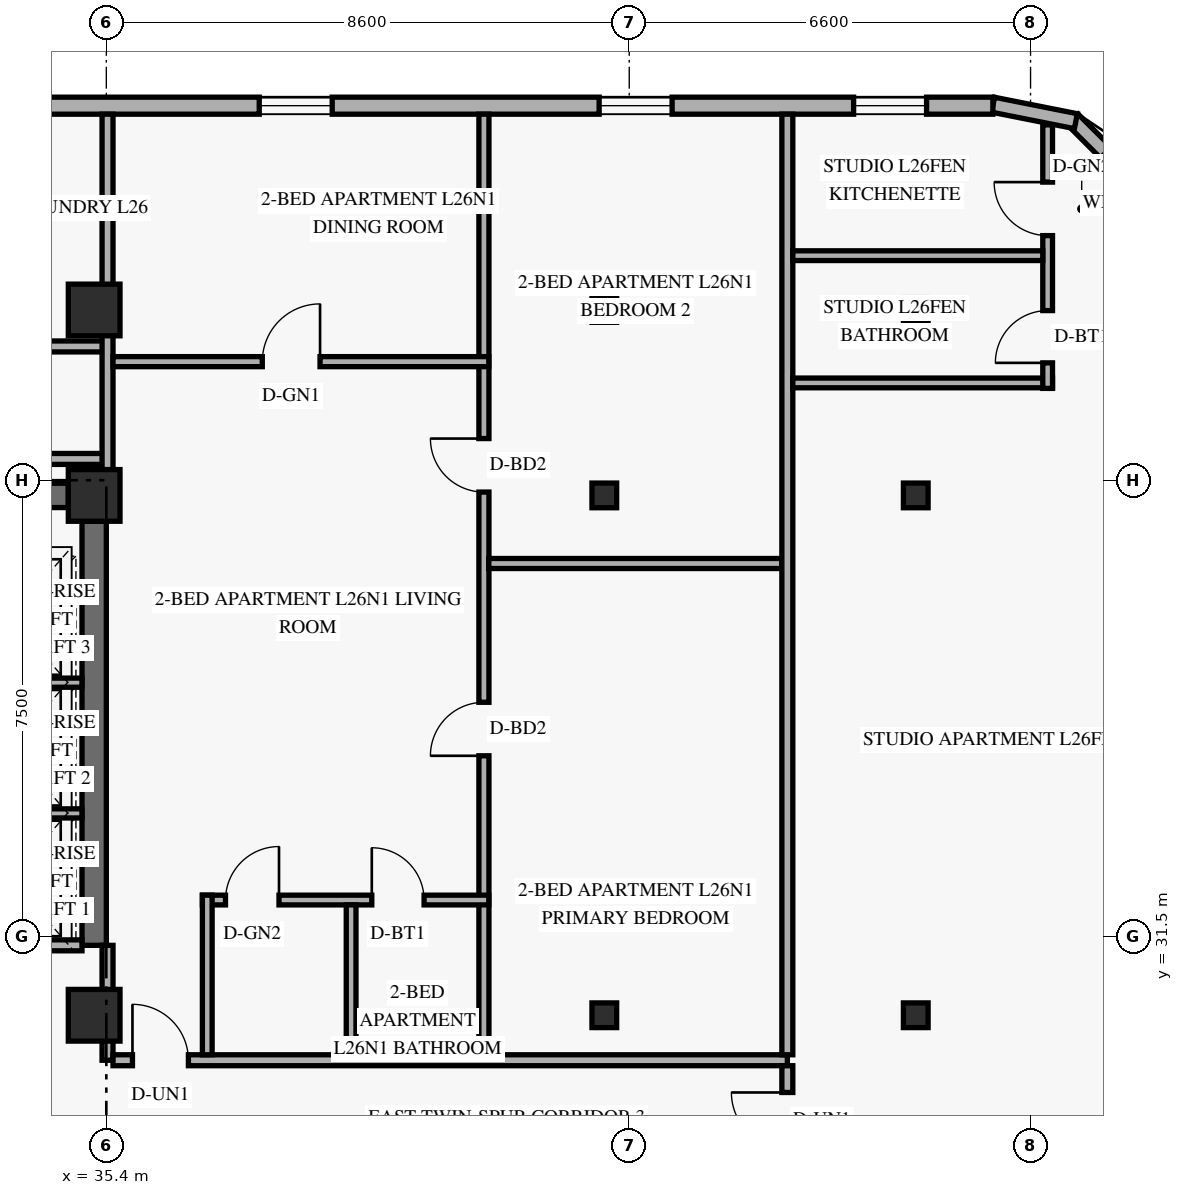
"""IFC4 building model, lengths in metres.
Left out: names, types, materials, properties, quantities, classifications, styles, units other than length and angle.
Written with IfcOpenShell. Run it as: python <this file> out.ifc"""

import sys

from ifc_helpers import new_model, si_unit, direction, frame, frame_2d, origin, origin_2d, place, context, subcontext, project, spatial, rectangle, hollow_rectangle, extrude, element, fill, save


model = new_model("IFC4")
c1 = context("Model", 3, precision=1e-05, world=origin(), true_north=direction((0.0, 1.0)))
c2 = subcontext(c1, "Body", "Model", "MODEL_VIEW")
j1 = project(units=[si_unit("LENGTHUNIT", "METRE"), si_unit("PLANEANGLEUNIT", "RADIAN")], contexts=[c1])
p1 = place(None, origin())
s1 = spatial("IfcSite", under=j1, at=p1, CompositionType="ELEMENT")
p2 = place(p1, origin())
s2 = spatial("IfcBuilding", under=s1, at=p2, CompositionType="ELEMENT")
p3 = place(p2, frame((0.0, 0.0, 102.6)))
s3 = spatial("IfcBuildingStorey", under=s2, at=p3, CompositionType="ELEMENT", Elevation=102.6)
p4 = place(p3, frame((35.2, 31.35, 0.0), z_axis=(0.0, 0.0, 1.0), x_axis=(0.0, 1.0, 0.0)))
e1 = element("IfcWall", 1, at=p4, inside=s3, PredefinedType="SHEAR", context=c2, shape_type="SweptSolid", body=[
    extrude(rectangle(XDim=6.975, YDim=0.4, at=frame_2d((3.487, 0.0))), origin(), (0.0, 0.0, 1.0), 2.749),
])
p5 = place(p3, frame((24.625, 38.75, 0.0), z_axis=(0.0, 0.0, 1.0), x_axis=(1.0, 0.0, 0.0)))
e2 = element("IfcWall", 2, at=p5, inside=s3, PredefinedType="SHEAR", context=c2, shape_type="SweptSolid", body=[
    extrude(rectangle(XDim=10.15, YDim=0.4, at=frame_2d((5.075, 0.0))), origin(), (0.0, 0.0, 1.0), 3.36),
])
p6 = place(p5, frame((5.2, 0.0, 0.0)))
e3 = element("IfcOpeningElement", 3, at=p6, cuts=e2, PredefinedType="OPENING", context=c2, shape_type="SweptSolid", body=[
    extrude(rectangle(XDim=1.05, YDim=2.15, at=frame_2d((0.525, 1.075))), frame((0.0, 0.21, 0.0), z_axis=(0.0, -1.0, 0.0), x_axis=(1.0, 0.0, 0.0)), (0.0, 0.0, 1.0), 0.42),
])
for number, where, z_axis, x_axis in (
    (4, (35.2, 30.2, 0.0), (0.0, 0.0, 1.0), (1.0, 0.0, 0.0)),
    (5, (35.2, 38.75, 0.0), (0.0, 0.0, 1.0), (1.0, 0.0, 0.0)),
    (6, (35.2, 41.8, 0.0), (0.0, 0.0, 1.0), (1.0, 0.0, 0.0)),
):
    element("IfcColumn", number, at=place(p3, frame(where, z_axis=z_axis, x_axis=x_axis)), inside=s3, PredefinedType="COLUMN", context=c2, shape_type="SweptSolid", body=[
        extrude(rectangle(XDim=0.85, YDim=0.85, at=origin_2d()), origin(), (0.0, 0.0, 1.0), 3.6),
    ])
for number, where, z_axis, x_axis in (
    (7, (43.527, 30.2, 0.0), (0.035, 0.0, 0.999), (0.0, 1.0, 0.0)),
    (8, (43.527, 38.75, 0.0), (0.035, 0.0, 0.999), (0.0, 1.0, 0.0)),
    (9, (43.527, 41.8, 0.0), (0.035, 0.0, 0.999), (0.0, 1.0, 0.0)),
):
    element("IfcColumn", number, at=place(p3, frame(where, z_axis=z_axis, x_axis=x_axis)), inside=s3, PredefinedType="COLUMN", context=c2, shape_type="SweptSolid", body=[
        extrude(hollow_rectangle(XDim=0.406, YDim=0.406, WallThickness=0.016, at=origin_2d()), origin(), (0.0, 0.0, 1.0), 3.602),
    ])
for number, where, z_axis, x_axis in (
    (10, (48.608, 30.2, 0.0), (0.058, 0.0, 0.998), (0.0, 1.0, 0.0)),
    (11, (48.608, 38.75, 0.0), (0.058, 0.0, 0.998), (0.0, 1.0, 0.0)),
    (12, (48.608, 41.8, 0.0), (0.058, 0.0, 0.998), (0.0, 1.0, 0.0)),
):
    element("IfcColumn", number, at=place(p3, frame(where, z_axis=z_axis, x_axis=x_axis)), inside=s3, PredefinedType="COLUMN", context=c2, shape_type="SweptSolid", body=[
        extrude(hollow_rectangle(XDim=0.406, YDim=0.406, WallThickness=0.016, at=origin_2d()), origin(), (0.0, 0.0, 1.0), 3.606),
    ])
p7 = place(p3, frame((53.232, 42.995, 0.0), z_axis=(0.0, 0.0, 1.0), x_axis=(-0.707151344399, 0.707062215165, 0.0)))
e13 = element("IfcWall", 13, at=p7, inside=s3, PredefinedType="SOLIDWALL", context=c2, shape_type="SweptSolid", body=[
    extrude(rectangle(XDim=2.739, YDim=0.25, at=frame_2d((1.37, 0.0))), origin(), (0.0, 0.0, 1.0), 3.36),
])
p8 = place(p7, frame((0.77, 0.0, 0.85)))
e14 = element("IfcOpeningElement", 14, at=p8, cuts=e13, PredefinedType="OPENING", context=c2, shape_type="SweptSolid", body=[
    extrude(rectangle(XDim=1.2, YDim=1.5, at=frame_2d((0.6, 0.75))), frame((0.0, 0.135, 0.0), z_axis=(0.0, -1.0, 0.0), x_axis=(1.0, 0.0, 0.0)), (0.0, 0.0, 1.0), 0.27),
])
p9 = place(p3, frame((51.345, 44.905, 0.0), z_axis=(0.0, 0.0, 1.0), x_axis=(-0.980809899341, 0.19496651342, 0.0)))
e15 = element("IfcWall", 15, at=p9, inside=s3, PredefinedType="SOLIDWALL", context=c2, shape_type="SweptSolid", body=[
    extrude(rectangle(XDim=1.389, YDim=0.25, at=frame_2d((0.694, 0.0))), origin(), (0.0, 0.0, 1.0), 3.36),
])
p10 = place(p3, frame((49.98, 45.16, 0.0), z_axis=(0.0, 0.0, 1.0), x_axis=(-1.0, 0.0, 0.0)))
e16 = element("IfcWall", 16, at=p10, inside=s3, PredefinedType="SOLIDWALL", context=c2, shape_type="SweptSolid", body=[
    extrude(rectangle(XDim=36.56, YDim=0.28, at=frame_2d((18.28, 0.0))), origin(), (0.0, 0.0, 1.0), 3.36),
])
p11 = place(p10, frame((31.845, 0.0, 0.85)))
e17 = element("IfcOpeningElement", 17, at=p11, cuts=e16, PredefinedType="OPENING", context=c2, shape_type="SweptSolid", body=[
    extrude(rectangle(XDim=1.2, YDim=1.5, at=frame_2d((0.6, 0.75))), frame((0.0, 0.15, 0.0), z_axis=(0.0, -1.0, 0.0), x_axis=(1.0, 0.0, 0.0)), (0.0, 0.0, 1.0), 0.3),
])
p12 = place(p10, frame((23.78, 0.0, 0.85)))
e18 = element("IfcOpeningElement", 18, at=p12, cuts=e16, PredefinedType="OPENING", context=c2, shape_type="SweptSolid", body=[
    extrude(rectangle(XDim=1.2, YDim=1.5, at=frame_2d((0.6, 0.75))), frame((0.0, 0.15, 0.0), z_axis=(0.0, -1.0, 0.0), x_axis=(1.0, 0.0, 0.0)), (0.0, 0.0, 1.0), 0.3),
])
p13 = place(p10, frame((16.895, 0.0, 0.85)))
e19 = element("IfcOpeningElement", 19, at=p13, cuts=e16, PredefinedType="OPENING", context=c2, shape_type="SweptSolid", body=[
    extrude(rectangle(XDim=1.2, YDim=1.5, at=frame_2d((0.6, 0.75))), frame((0.0, 0.15, 0.0), z_axis=(0.0, -1.0, 0.0), x_axis=(1.0, 0.0, 0.0)), (0.0, 0.0, 1.0), 0.3),
])
p14 = place(p10, frame((10.865, 0.0, 0.85)))
e20 = element("IfcOpeningElement", 20, at=p14, cuts=e16, PredefinedType="OPENING", context=c2, shape_type="SweptSolid", body=[
    extrude(rectangle(XDim=1.2, YDim=1.5, at=frame_2d((0.6, 0.75))), frame((0.0, 0.15, 0.0), z_axis=(0.0, -1.0, 0.0), x_axis=(1.0, 0.0, 0.0)), (0.0, 0.0, 1.0), 0.3),
])
p15 = place(p10, frame((5.275, 0.0, 0.85)))
e21 = element("IfcOpeningElement", 21, at=p15, cuts=e16, PredefinedType="OPENING", context=c2, shape_type="SweptSolid", body=[
    extrude(rectangle(XDim=1.2, YDim=1.5, at=frame_2d((0.6, 0.75))), frame((0.0, 0.15, 0.0), z_axis=(0.0, -1.0, 0.0), x_axis=(1.0, 0.0, 0.0)), (0.0, 0.0, 1.0), 0.3),
])
p16 = place(p10, frame((1.09, 0.0, 0.85)))
e22 = element("IfcOpeningElement", 22, at=p16, cuts=e16, PredefinedType="OPENING", context=c2, shape_type="SweptSolid", body=[
    extrude(rectangle(XDim=1.2, YDim=1.5, at=frame_2d((0.6, 0.75))), frame((0.0, 0.15, 0.0), z_axis=(0.0, -1.0, 0.0), x_axis=(1.0, 0.0, 0.0)), (0.0, 0.0, 1.0), 0.3),
])
p17 = place(p3, frame((32.74, 31.35, 0.0), z_axis=(0.0, 0.0, 1.0), x_axis=(1.0, 0.0, 0.0)))
e23 = element("IfcWall", 23, at=p17, inside=s3, PredefinedType="STANDARD", context=c2, shape_type="SweptSolid", body=[
    extrude(rectangle(XDim=2.26, YDim=0.18, at=frame_2d((1.13, 0.0))), origin(), (0.0, 0.0, 1.0), 3.36),
])
for number, where, z_axis, x_axis in (
    (24, (32.74, 33.52, 0.0), (0.0, 0.0, 1.0), (1.0, 0.0, 0.0)),
    (25, (32.74, 35.67, 0.0), (0.0, 0.0, 1.0), (1.0, 0.0, 0.0)),
):
    element("IfcWall", number, at=place(p3, frame(where, z_axis=z_axis, x_axis=x_axis)), inside=s3, PredefinedType="STANDARD", context=c2, shape_type="SweptSolid", body=[
        extrude(rectangle(XDim=2.26, YDim=0.15, at=frame_2d((1.13, 0.0))), origin(), (0.0, 0.0, 1.0), 3.36),
    ])
p18 = place(p3, frame((35.42, 29.46, 0.0), z_axis=(0.0, 0.0, 1.0), x_axis=(0.0, 1.0, 0.0)))
e26 = element("IfcWall", 26, at=p18, inside=s3, PredefinedType="STANDARD", context=c2, shape_type="SweptSolid", body=[
    extrude(rectangle(XDim=1.89, YDim=0.18, at=frame_2d((0.945, 0.0))), origin(), (0.0, 0.0, 1.0), 2.731),
])
p19 = place(p3, frame((35.51, 29.46, 0.0), z_axis=(0.0, 0.0, 1.0), x_axis=(1.0, 0.0, 0.0)))
e27 = element("IfcWall", 27, at=p19, inside=s3, PredefinedType="STANDARD", context=c2, shape_type="SweptSolid", body=[
    extrude(rectangle(XDim=11.09, YDim=0.18, at=frame_2d((5.545, 0.0))), origin(), (0.0, 0.0, 1.0), 2.731),
])
p20 = place(p19, frame((0.32, 0.0, 0.0)))
e28 = element("IfcOpeningElement", 28, at=p20, cuts=e27, PredefinedType="OPENING", context=c2, shape_type="SweptSolid", body=[
    extrude(rectangle(XDim=0.92, YDim=2.15, at=frame_2d((0.46, 1.075))), frame((0.0, 0.1, 0.0), z_axis=(0.0, -1.0, 0.0), x_axis=(1.0, 0.0, 0.0)), (0.0, 0.0, 1.0), 0.2),
])
p21 = place(p3, frame((21.74, 41.2, 0.0), z_axis=(0.0, 0.0, 1.0), x_axis=(1.0, 0.0, 0.0)))
e29 = element("IfcWall", 29, at=p21, inside=s3, PredefinedType="STANDARD", context=c2, shape_type="SweptSolid", body=[
    extrude(rectangle(XDim=13.68, YDim=0.18, at=frame_2d((6.84, 0.0))), origin(), (0.0, 0.0, 1.0), 2.731),
])
p22 = place(p21, frame((3.09, 0.0, 0.0)))
e30 = element("IfcOpeningElement", 30, at=p22, cuts=e29, PredefinedType="OPENING", context=c2, shape_type="SweptSolid", body=[
    extrude(rectangle(XDim=0.95, YDim=2.15, at=frame_2d((0.475, 1.075))), frame((0.0, 0.1, 0.0), z_axis=(0.0, -1.0, 0.0), x_axis=(1.0, 0.0, 0.0)), (0.0, 0.0, 1.0), 0.2),
])
p23 = place(p21, frame((10.11, 0.0, 0.0)))
e31 = element("IfcOpeningElement", 31, at=p23, cuts=e29, PredefinedType="OPENING", context=c2, shape_type="SweptSolid", body=[
    extrude(rectangle(XDim=0.95, YDim=2.15, at=frame_2d((0.475, 1.075))), frame((0.0, 0.1, 0.0), z_axis=(0.0, -1.0, 0.0), x_axis=(1.0, 0.0, 0.0)), (0.0, 0.0, 1.0), 0.2),
])
p24 = place(p3, frame((23.85, 39.35, 0.0), z_axis=(0.0, 0.0, 1.0), x_axis=(1.0, 0.0, 0.0)))
e32 = element("IfcWall", 32, at=p24, inside=s3, PredefinedType="STANDARD", context=c2, shape_type="SweptSolid", body=[
    extrude(rectangle(XDim=11.57, YDim=0.18, at=frame_2d((5.785, 0.0))), origin(), (0.0, 0.0, 1.0), 2.731),
])
p25 = place(p3, frame((35.42, 38.75, 0.0), z_axis=(0.0, 0.0, 1.0), x_axis=(0.0, 1.0, 0.0)))
e33 = element("IfcWall", 33, at=p25, inside=s3, PredefinedType="PARTITIONING", context=c2, shape_type="SweptSolid", body=[
    extrude(rectangle(XDim=6.27, YDim=0.18, at=frame_2d((3.135, 0.0))), origin(), (0.0, 0.0, 1.0), 2.731),
])
p26 = place(p3, frame((41.61, 29.55, 0.0), z_axis=(0.0, 0.0, 1.0), x_axis=(0.0, 1.0, 0.0)))
e34 = element("IfcWall", 34, at=p26, inside=s3, PredefinedType="PARTITIONING", context=c2, shape_type="SweptSolid", body=[
    extrude(rectangle(XDim=15.47, YDim=0.165, at=frame_2d((7.735, 0.0))), origin(), (0.0, 0.0, 1.0), 2.731),
])
p27 = place(p26, frame((4.917, 0.0, 0.0)))
e35 = element("IfcOpeningElement", 35, at=p27, cuts=e34, PredefinedType="OPENING", context=c2, shape_type="SweptSolid", body=[
    extrude(rectangle(XDim=0.88, YDim=2.14, at=frame_2d((0.44, 1.07))), frame((0.0, 0.093, 0.0), z_axis=(0.0, -1.0, 0.0), x_axis=(1.0, 0.0, 0.0)), (0.0, 0.0, 1.0), 0.185),
])
p28 = place(p26, frame((9.255, 0.0, 0.0)))
e36 = element("IfcOpeningElement", 36, at=p28, cuts=e34, PredefinedType="OPENING", context=c2, shape_type="SweptSolid", body=[
    extrude(rectangle(XDim=0.88, YDim=2.14, at=frame_2d((0.44, 1.07))), frame((0.0, 0.093, 0.0), z_axis=(0.0, -1.0, 0.0), x_axis=(1.0, 0.0, 0.0)), (0.0, 0.0, 1.0), 0.185),
])
p29 = place(p3, frame((36.98, 32.095, 0.0), z_axis=(0.0, 0.0, 1.0), x_axis=(1.0, 0.0, 0.0)))
e37 = element("IfcWall", 37, at=p29, inside=s3, PredefinedType="PLUMBINGWALL", context=c2, shape_type="SweptSolid", body=[
    extrude(rectangle(XDim=4.71, YDim=0.16, at=frame_2d((2.355, 0.0))), origin(), (0.0, 0.0, 1.0), 3.36),
])
p30 = place(p29, frame((0.38, 0.0, 0.0)))
e38 = element("IfcOpeningElement", 38, at=p30, cuts=e37, PredefinedType="OPENING", context=c2, shape_type="SweptSolid", body=[
    extrude(rectangle(XDim=0.88, YDim=2.12, at=frame_2d((0.44, 1.06))), frame((0.0, 0.09, 0.0), z_axis=(0.0, -1.0, 0.0), x_axis=(1.0, 0.0, 0.0)), (0.0, 0.0, 1.0), 0.18),
])
p31 = place(p29, frame((2.786, 0.0, 0.0)))
e39 = element("IfcOpeningElement", 39, at=p31, cuts=e37, PredefinedType="OPENING", context=c2, shape_type="SweptSolid", body=[
    extrude(rectangle(XDim=0.86, YDim=2.12, at=frame_2d((0.43, 1.06))), frame((0.0, 0.09, 0.0), z_axis=(0.0, -1.0, 0.0), x_axis=(1.0, 0.0, 0.0)), (0.0, 0.0, 1.0), 0.18),
])
p32 = place(p3, frame((37.06, 29.55, 0.0), z_axis=(0.0, 0.0, 1.0), x_axis=(0.0, 1.0, 0.0)))
e40 = element("IfcWall", 40, at=p32, inside=s3, PredefinedType="PLUMBINGWALL", context=c2, shape_type="SweptSolid", body=[
    extrude(rectangle(XDim=2.625, YDim=0.16, at=frame_2d((1.312, 0.0))), origin(), (0.0, 0.0, 1.0), 2.731),
])
p33 = place(p3, frame((39.426, 29.55, 0.0), z_axis=(0.0, 0.0, 1.0), x_axis=(0.0, 1.0, 0.0)))
e41 = element("IfcWall", 41, at=p33, inside=s3, PredefinedType="PLUMBINGWALL", context=c2, shape_type="SweptSolid", body=[
    extrude(rectangle(XDim=2.465, YDim=0.16, at=frame_2d((1.232, 0.0))), origin(), (0.0, 0.0, 1.0), 2.731),
])
p34 = place(p3, frame((35.51, 40.95, 0.0), z_axis=(0.0, 0.0, 1.0), x_axis=(1.0, 0.0, 0.0)))
e42 = element("IfcWall", 42, at=p34, inside=s3, PredefinedType="PARTITIONING", context=c2, shape_type="SweptSolid", body=[
    extrude(rectangle(XDim=6.18, YDim=0.165, at=frame_2d((3.09, 0.0))), origin(), (0.0, 0.0, 1.0), 3.36),
])
p35 = place(p34, frame((2.455, 0.0, 0.0)))
e43 = element("IfcOpeningElement", 43, at=p35, cuts=e42, PredefinedType="OPENING", context=c2, shape_type="SweptSolid", body=[
    extrude(rectangle(XDim=0.95, YDim=2.15, at=frame_2d((0.475, 1.075))), frame((0.0, 0.093, 0.0), z_axis=(0.0, -1.0, 0.0), x_axis=(1.0, 0.0, 0.0)), (0.0, 0.0, 1.0), 0.185),
])
p36 = place(p3, frame((41.69, 37.63, 0.0), z_axis=(0.0, 0.0, 1.0), x_axis=(1.0, 0.0, 0.0)))
e44 = element("IfcWall", 44, at=p36, inside=s3, PredefinedType="PARTITIONING", context=c2, shape_type="SweptSolid", body=[
    extrude(rectangle(XDim=4.82, YDim=0.165, at=frame_2d((2.41, 0.0))), origin(), (0.0, 0.0, 1.0), 2.731),
])
p37 = place(p3, frame((46.6, 27.65, 0.0), z_axis=(0.0, 0.0, 1.0), x_axis=(0.0, 1.0, 0.0)))
e45 = element("IfcWall", 45, at=p37, inside=s3, PredefinedType="STANDARD", context=c2, shape_type="SweptSolid", body=[
    extrude(rectangle(XDim=1.72, YDim=0.18, at=frame_2d((0.86, 0.0))), origin(), (0.0, 0.0, 1.0), 3.36),
])
p38 = place(p37, frame((0.36, 0.0, 0.0)))
e46 = element("IfcOpeningElement", 46, at=p38, cuts=e45, PredefinedType="OPENING", context=c2, shape_type="SweptSolid", body=[
    extrude(rectangle(XDim=0.92, YDim=2.15, at=frame_2d((0.46, 1.075))), frame((0.0, 0.1, 0.0), z_axis=(0.0, -1.0, 0.0), x_axis=(1.0, 0.0, 0.0)), (0.0, 0.0, 1.0), 0.2),
])
p39 = place(p3, frame((46.6, 29.55, 0.0), z_axis=(0.0, 0.0, 1.0), x_axis=(0.0, 1.0, 0.0)))
e47 = element("IfcWall", 47, at=p39, inside=s3, PredefinedType="PARTITIONING", context=c2, shape_type="SweptSolid", body=[
    extrude(rectangle(XDim=15.47, YDim=0.18, at=frame_2d((7.735, 0.0))), origin(), (0.0, 0.0, 1.0), 2.731),
])
p40 = place(p3, frame((46.69, 40.6, 0.0), z_axis=(0.0, 0.0, 1.0), x_axis=(1.0, 0.0, 0.0)))
e48 = element("IfcWall", 48, at=p40, inside=s3, PredefinedType="PLUMBINGWALL", context=c2, shape_type="SweptSolid", body=[
    extrude(rectangle(XDim=4.271, YDim=0.16, at=frame_2d((2.136, 0.0))), origin(), (0.0, 0.0, 1.0), 2.809),
])
p41 = place(p3, frame((50.881, 40.51, 0.0), z_axis=(0.0, 0.0, 1.0), x_axis=(0.0, 1.0, 0.0)))
e49 = element("IfcWall", 49, at=p41, inside=s3, PredefinedType="PLUMBINGWALL", context=c2, shape_type="SweptSolid", body=[
    extrude(rectangle(XDim=4.334, YDim=0.16, at=frame_2d((2.167, 0.0))), origin(), (0.0, 0.0, 1.0), 3.36),
])
p42 = place(p41, frame((0.42, 0.0, 0.0)))
e50 = element("IfcOpeningElement", 50, at=p42, cuts=e49, PredefinedType="OPENING", context=c2, shape_type="SweptSolid", body=[
    extrude(rectangle(XDim=0.86, YDim=2.12, at=frame_2d((0.43, 1.06))), frame((0.0, 0.09, 0.0), z_axis=(0.0, -1.0, 0.0), x_axis=(1.0, 0.0, 0.0)), (0.0, 0.0, 1.0), 0.18),
])
p43 = place(p41, frame((2.513, 0.0, 0.0)))
e51 = element("IfcOpeningElement", 51, at=p43, cuts=e49, PredefinedType="OPENING", context=c2, shape_type="SweptSolid", body=[
    extrude(rectangle(XDim=0.88, YDim=2.12, at=frame_2d((0.44, 1.06))), frame((0.0, 0.09, 0.0), z_axis=(0.0, -1.0, 0.0), x_axis=(1.0, 0.0, 0.0)), (0.0, 0.0, 1.0), 0.18),
])
p44 = place(p3, frame((46.69, 42.693, 0.0), z_axis=(0.0, 0.0, 1.0), x_axis=(1.0, 0.0, 0.0)))
e52 = element("IfcWall", 52, at=p44, inside=s3, PredefinedType="PLUMBINGWALL", context=c2, shape_type="SweptSolid", body=[
    extrude(rectangle(XDim=4.111, YDim=0.16, at=frame_2d((2.056, 0.0))), origin(), (0.0, 0.0, 1.0), 3.36),
])
p45 = place(p14, origin())
e53 = element("IfcWindow", 53, at=p45, inside=s3, PartitioningType="SINGLE_PANEL", PredefinedType="WINDOW", context=c2, shape_type="SweptSolid", body=[
    extrude(rectangle(XDim=1.2, YDim=1.5, at=frame_2d((0.6, 0.75))), frame((0.0, 0.03, 0.0), z_axis=(0.0, -1.0, 0.0), x_axis=(1.0, 0.0, 0.0)), (0.0, 0.0, 1.0), 0.06),
])
fill(e20, e53)
p46 = place(p15, origin())
e54 = element("IfcWindow", 54, at=p46, inside=s3, PartitioningType="SINGLE_PANEL", PredefinedType="WINDOW", context=c2, shape_type="SweptSolid", body=[
    extrude(rectangle(XDim=1.2, YDim=1.5, at=frame_2d((0.6, 0.75))), frame((0.0, 0.03, 0.0), z_axis=(0.0, -1.0, 0.0), x_axis=(1.0, 0.0, 0.0)), (0.0, 0.0, 1.0), 0.06),
])
fill(e21, e54)
p47 = place(p16, origin())
e55 = element("IfcWindow", 55, at=p47, inside=s3, PartitioningType="SINGLE_PANEL", PredefinedType="WINDOW", context=c2, shape_type="SweptSolid", body=[
    extrude(rectangle(XDim=1.2, YDim=1.5, at=frame_2d((0.6, 0.75))), frame((0.0, 0.03, 0.0), z_axis=(0.0, -1.0, 0.0), x_axis=(1.0, 0.0, 0.0)), (0.0, 0.0, 1.0), 0.06),
])
fill(e22, e55)
p48 = place(p35, origin())
e56 = element("IfcDoor", 56, at=p48, inside=s3, OperationType="SINGLE_SWING_RIGHT", PredefinedType="DOOR", context=c2, shape_type="SweptSolid", body=[
    extrude(rectangle(XDim=0.95, YDim=2.15, at=frame_2d((0.475, 1.075))), frame((0.0, 0.025, 0.0), z_axis=(0.0, -1.0, 0.0), x_axis=(1.0, 0.0, 0.0)), (0.0, 0.0, 1.0), 0.05),
])
fill(e43, e56)
p49 = place(p20, origin())
e57 = element("IfcDoor", 57, at=p49, inside=s3, OperationType="SINGLE_SWING_LEFT", PredefinedType="DOOR", context=c2, shape_type="SweptSolid", body=[
    extrude(rectangle(XDim=0.92, YDim=2.15, at=frame_2d((0.46, 1.075))), frame((0.0, 0.025, 0.0), z_axis=(0.0, -1.0, 0.0), x_axis=(1.0, 0.0, 0.0)), (0.0, 0.0, 1.0), 0.05),
])
fill(e28, e57)
p50 = place(p30, origin())
e58 = element("IfcDoor", 58, at=p50, inside=s3, OperationType="SINGLE_SWING_RIGHT", PredefinedType="DOOR", context=c2, shape_type="SweptSolid", body=[
    extrude(rectangle(XDim=0.88, YDim=2.12, at=frame_2d((0.44, 1.06))), frame((0.0, 0.025, 0.0), z_axis=(0.0, -1.0, 0.0), x_axis=(1.0, 0.0, 0.0)), (0.0, 0.0, 1.0), 0.05),
])
fill(e38, e58)
p51 = place(p31, origin())
e59 = element("IfcDoor", 59, at=p51, inside=s3, OperationType="SINGLE_SWING_LEFT", PredefinedType="DOOR", context=c2, shape_type="SweptSolid", body=[
    extrude(rectangle(XDim=0.86, YDim=2.12, at=frame_2d((0.43, 1.06))), frame((0.0, 0.025, 0.0), z_axis=(0.0, -1.0, 0.0), x_axis=(1.0, 0.0, 0.0)), (0.0, 0.0, 1.0), 0.05),
])
fill(e39, e59)
p52 = place(p27, origin())
e60 = element("IfcDoor", 60, at=p52, inside=s3, OperationType="SINGLE_SWING_LEFT", PredefinedType="DOOR", context=c2, shape_type="SweptSolid", body=[
    extrude(rectangle(XDim=0.88, YDim=2.14, at=frame_2d((0.44, 1.07))), frame((0.0, 0.025, 0.0), z_axis=(0.0, -1.0, 0.0), x_axis=(1.0, 0.0, 0.0)), (0.0, 0.0, 1.0), 0.05),
])
fill(e35, e60)
p53 = place(p28, origin())
e61 = element("IfcDoor", 61, at=p53, inside=s3, OperationType="SINGLE_SWING_RIGHT", PredefinedType="DOOR", context=c2, shape_type="SweptSolid", body=[
    extrude(rectangle(XDim=0.88, YDim=2.14, at=frame_2d((0.44, 1.07))), frame((0.0, 0.025, 0.0), z_axis=(0.0, -1.0, 0.0), x_axis=(1.0, 0.0, 0.0)), (0.0, 0.0, 1.0), 0.05),
])
fill(e36, e61)
p54 = place(p38, origin())
e62 = element("IfcDoor", 62, at=p54, inside=s3, OperationType="SINGLE_SWING_RIGHT", PredefinedType="DOOR", context=c2, shape_type="SweptSolid", body=[
    extrude(rectangle(XDim=0.92, YDim=2.15, at=frame_2d((0.46, 1.075))), frame((0.0, 0.025, 0.0), z_axis=(0.0, -1.0, 0.0), x_axis=(1.0, 0.0, 0.0)), (0.0, 0.0, 1.0), 0.05),
])
fill(e46, e62)
p55 = place(p42, origin())
e63 = element("IfcDoor", 63, at=p55, inside=s3, OperationType="SINGLE_SWING_LEFT", PredefinedType="DOOR", context=c2, shape_type="SweptSolid", body=[
    extrude(rectangle(XDim=0.86, YDim=2.12, at=frame_2d((0.43, 1.06))), frame((0.0, 0.025, 0.0), z_axis=(0.0, -1.0, 0.0), x_axis=(1.0, 0.0, 0.0)), (0.0, 0.0, 1.0), 0.05),
])
fill(e50, e63)
p56 = place(p43, origin())
e64 = element("IfcDoor", 64, at=p56, inside=s3, OperationType="SINGLE_SWING_RIGHT", PredefinedType="DOOR", context=c2, shape_type="SweptSolid", body=[
    extrude(rectangle(XDim=0.88, YDim=2.12, at=frame_2d((0.44, 1.06))), frame((0.0, 0.025, 0.0), z_axis=(0.0, -1.0, 0.0), x_axis=(1.0, 0.0, 0.0)), (0.0, 0.0, 1.0), 0.05),
])
fill(e51, e64)
save(model, sys.argv[1])
